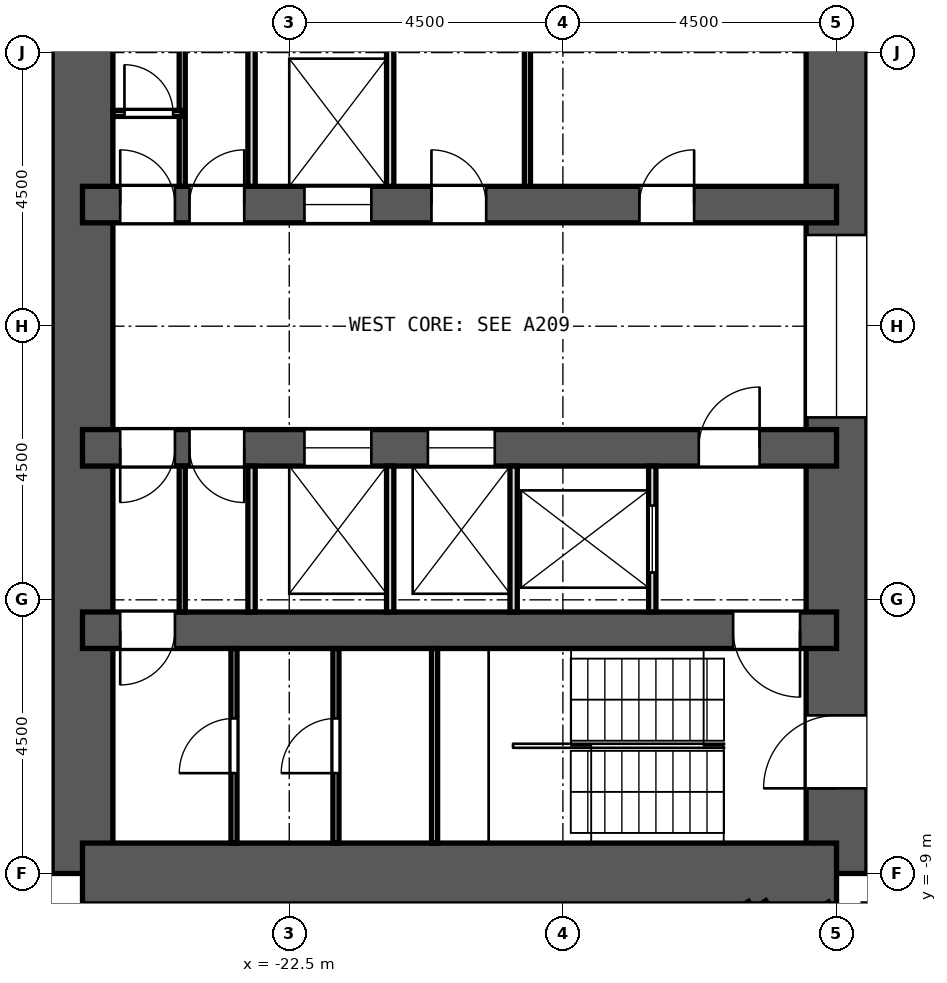
"""IFC4 building model, lengths in metres.
Left out: names, types, materials, properties, quantities, classifications, styles, units other than length and angle.
Written with IfcOpenShell. Run it as: python <this file> out.ifc"""

import sys

from ifc_helpers import new_model, si_unit, direction, frame, frame_2d, origin, place, context, subcontext, project, spatial, rectangle, extrude, element, fill, save


model = new_model("IFC4")
c1 = context("Model", 3, precision=1e-05, world=origin(), true_north=direction((0.0, 1.0)))
c2 = subcontext(c1, "Body", "Model", "MODEL_VIEW")
j1 = project(units=[si_unit("LENGTHUNIT", "METRE"), si_unit("PLANEANGLEUNIT", "RADIAN")], contexts=[c1])
p1 = place(None, origin())
s1 = spatial("IfcSite", under=j1, at=p1, CompositionType="ELEMENT")
p2 = place(p1, origin())
s2 = spatial("IfcBuilding", under=s1, at=p2, CompositionType="ELEMENT")
p3 = place(p2, frame((0.0, 0.0, 26.3)))
s3 = spatial("IfcBuildingStorey", under=s2, at=p3, CompositionType="ELEMENT", Elevation=26.3)
p4 = place(p3, frame((-13.5, -9.0, 0.0), z_axis=(0.0, 0.0, 1.0), x_axis=(0.0, 1.0, 0.0)))
e1 = element("IfcWall", 1, at=p4, inside=s3, PredefinedType="SHEAR", context=c2, shape_type="SweptSolid", body=[
    extrude(rectangle(XDim=18.0, YDim=1.0, at=frame_2d((9.0, 0.0))), origin(), (0.0, 0.0, 1.0), 3.3),
])
p5 = place(p4, frame((15.4, 0.0, 0.0)))
e2 = element("IfcOpeningElement", 2, at=p5, cuts=e1, PredefinedType="OPENING", context=c2, shape_type="SweptSolid", body=[
    extrude(rectangle(XDim=1.2, YDim=2.1, at=frame_2d((0.6, 1.05))), frame((0.0, 0.512, 0.0), z_axis=(0.0, -1.0, 0.0), x_axis=(1.0, 0.0, 0.0)), (0.0, 0.0, 1.0), 1.024),
])
p6 = place(p4, frame((1.4, 0.0, 0.0)))
e3 = element("IfcOpeningElement", 3, at=p6, cuts=e1, PredefinedType="OPENING", context=c2, shape_type="SweptSolid", body=[
    extrude(rectangle(XDim=1.2, YDim=2.1, at=frame_2d((0.6, 1.05))), frame((0.0, 0.512, 0.0), z_axis=(0.0, -1.0, 0.0), x_axis=(1.0, 0.0, 0.0)), (0.0, 0.0, 1.0), 1.024),
])
p7 = place(p4, frame((7.5, 0.0, 0.0)))
e4 = element("IfcOpeningElement", 4, at=p7, cuts=e1, PredefinedType="OPENING", context=c2, shape_type="SweptSolid", body=[
    extrude(rectangle(XDim=3.0, YDim=2.4, at=frame_2d((1.5, 1.2))), frame((0.0, 0.512, 0.0), z_axis=(0.0, -1.0, 0.0), x_axis=(1.0, 0.0, 0.0)), (0.0, 0.0, 1.0), 1.024),
])
p8 = place(p3, frame((-25.9, -9.0, 0.0), z_axis=(0.0, 0.0, 1.0), x_axis=(0.0, 1.0, 0.0)))
e5 = element("IfcWall", 5, at=p8, inside=s3, PredefinedType="SHEAR", context=c2, shape_type="SweptSolid", body=[
    extrude(rectangle(XDim=18.0, YDim=1.0, at=frame_2d((9.0, 0.0))), origin(), (0.0, 0.0, 1.0), 3.3),
])
p9 = place(p3, frame((-13.5, -9.0, 0.0), z_axis=(0.0, 0.0, 1.0), x_axis=(-1.0, 0.0, 0.0)))
e6 = element("IfcWall", 6, at=p9, inside=s3, PredefinedType="SHEAR", context=c2, shape_type="SweptSolid", body=[
    extrude(rectangle(XDim=12.4, YDim=1.0, at=frame_2d((6.2, 0.0))), origin(), (0.0, 0.0, 1.0), 3.3),
])
p10 = place(p3, frame((-13.5, -5.0, 0.0), z_axis=(0.0, 0.0, 1.0), x_axis=(-1.0, 0.0, 0.0)))
e7 = element("IfcWall", 7, at=p10, inside=s3, PredefinedType="SHEAR", context=c2, shape_type="SweptSolid", body=[
    extrude(rectangle(XDim=12.4, YDim=0.6, at=frame_2d((6.2, 0.0))), origin(), (0.0, 0.0, 1.0), 3.3),
])
p11 = place(p10, frame((10.88, 0.0, 0.0)))
e8 = element("IfcOpeningElement", 8, at=p11, cuts=e7, PredefinedType="OPENING", context=c2, shape_type="SweptSolid", body=[
    extrude(rectangle(XDim=0.9, YDim=2.1, at=frame_2d((0.45, 1.05))), frame((0.0, 0.312, 0.0), z_axis=(0.0, -1.0, 0.0), x_axis=(1.0, 0.0, 0.0)), (0.0, 0.0, 1.0), 0.624),
])
p12 = place(p10, frame((0.6, 0.0, 0.0)))
e9 = element("IfcOpeningElement", 9, at=p12, cuts=e7, PredefinedType="OPENING", context=c2, shape_type="SweptSolid", body=[
    extrude(rectangle(XDim=1.1, YDim=2.1, at=frame_2d((0.55, 1.05))), frame((0.0, 0.312, 0.0), z_axis=(0.0, -1.0, 0.0), x_axis=(1.0, 0.0, 0.0)), (0.0, 0.0, 1.0), 0.624),
])
p13 = place(p3, frame((-13.5, 2.0, 0.0), z_axis=(0.0, 0.0, 1.0), x_axis=(-1.0, 0.0, 0.0)))
e10 = element("IfcWall", 10, at=p13, inside=s3, PredefinedType="SHEAR", context=c2, shape_type="SweptSolid", body=[
    extrude(rectangle(XDim=12.4, YDim=0.6, at=frame_2d((6.2, 0.0))), origin(), (0.0, 0.0, 1.0), 3.3),
])
p14 = place(p13, frame((7.65, 0.0, 0.0)))
e11 = element("IfcOpeningElement", 11, at=p14, cuts=e10, PredefinedType="OPENING", context=c2, shape_type="SweptSolid", body=[
    extrude(rectangle(XDim=1.1, YDim=2.1, at=frame_2d((0.55, 1.05))), frame((0.0, 0.312, 0.0), z_axis=(0.0, -1.0, 0.0), x_axis=(1.0, 0.0, 0.0)), (0.0, 0.0, 1.0), 0.624),
])
p15 = place(p13, frame((2.341, 0.0, 0.0)))
e12 = element("IfcOpeningElement", 12, at=p15, cuts=e10, PredefinedType="OPENING", context=c2, shape_type="SweptSolid", body=[
    extrude(rectangle(XDim=0.9, YDim=2.1, at=frame_2d((0.45, 1.05))), frame((0.0, 0.312, 0.0), z_axis=(0.0, -1.0, 0.0), x_axis=(1.0, 0.0, 0.0)), (0.0, 0.0, 1.0), 0.624),
])
p16 = place(p13, frame((5.761, 0.0, 0.0)))
e13 = element("IfcOpeningElement", 13, at=p16, cuts=e10, PredefinedType="OPENING", context=c2, shape_type="SweptSolid", body=[
    extrude(rectangle(XDim=0.9, YDim=2.1, at=frame_2d((0.45, 1.05))), frame((0.0, 0.312, 0.0), z_axis=(0.0, -1.0, 0.0), x_axis=(1.0, 0.0, 0.0)), (0.0, 0.0, 1.0), 0.624),
])
p17 = place(p13, frame((9.74, 0.0, 0.0)))
e14 = element("IfcOpeningElement", 14, at=p17, cuts=e10, PredefinedType="OPENING", context=c2, shape_type="SweptSolid", body=[
    extrude(rectangle(XDim=0.9, YDim=2.1, at=frame_2d((0.45, 1.05))), frame((0.0, 0.312, 0.0), z_axis=(0.0, -1.0, 0.0), x_axis=(1.0, 0.0, 0.0)), (0.0, 0.0, 1.0), 0.624),
])
p18 = place(p13, frame((10.88, 0.0, 0.0)))
e15 = element("IfcOpeningElement", 15, at=p18, cuts=e10, PredefinedType="OPENING", context=c2, shape_type="SweptSolid", body=[
    extrude(rectangle(XDim=0.9, YDim=2.1, at=frame_2d((0.45, 1.05))), frame((0.0, 0.312, 0.0), z_axis=(0.0, -1.0, 0.0), x_axis=(1.0, 0.0, 0.0)), (0.0, 0.0, 1.0), 0.624),
])
p19 = place(p3, frame((-13.5, -2.0, 0.0), z_axis=(0.0, 0.0, 1.0), x_axis=(-1.0, 0.0, 0.0)))
e16 = element("IfcWall", 16, at=p19, inside=s3, PredefinedType="SHEAR", context=c2, shape_type="SweptSolid", body=[
    extrude(rectangle(XDim=12.4, YDim=0.6, at=frame_2d((6.2, 0.0))), origin(), (0.0, 0.0, 1.0), 3.3),
])
p20 = place(p19, frame((5.62, 0.0, 0.0)))
e17 = element("IfcOpeningElement", 17, at=p20, cuts=e16, PredefinedType="OPENING", context=c2, shape_type="SweptSolid", body=[
    extrude(rectangle(XDim=1.1, YDim=2.1, at=frame_2d((0.55, 1.05))), frame((0.0, 0.312, 0.0), z_axis=(0.0, -1.0, 0.0), x_axis=(1.0, 0.0, 0.0)), (0.0, 0.0, 1.0), 0.624),
])
p21 = place(p19, frame((7.65, 0.0, 0.0)))
e18 = element("IfcOpeningElement", 18, at=p21, cuts=e16, PredefinedType="OPENING", context=c2, shape_type="SweptSolid", body=[
    extrude(rectangle(XDim=1.1, YDim=2.1, at=frame_2d((0.55, 1.05))), frame((0.0, 0.312, 0.0), z_axis=(0.0, -1.0, 0.0), x_axis=(1.0, 0.0, 0.0)), (0.0, 0.0, 1.0), 0.624),
])
p22 = place(p19, frame((1.265, 0.0, 0.0)))
e19 = element("IfcOpeningElement", 19, at=p22, cuts=e16, PredefinedType="OPENING", context=c2, shape_type="SweptSolid", body=[
    extrude(rectangle(XDim=1.0, YDim=2.1, at=frame_2d((0.5, 1.05))), frame((0.0, 0.312, 0.0), z_axis=(0.0, -1.0, 0.0), x_axis=(1.0, 0.0, 0.0)), (0.0, 0.0, 1.0), 0.624),
])
p23 = place(p19, frame((9.74, 0.0, 0.0)))
e20 = element("IfcOpeningElement", 20, at=p23, cuts=e16, PredefinedType="OPENING", context=c2, shape_type="SweptSolid", body=[
    extrude(rectangle(XDim=0.9, YDim=2.1, at=frame_2d((0.45, 1.05))), frame((0.0, 0.312, 0.0), z_axis=(0.0, -1.0, 0.0), x_axis=(1.0, 0.0, 0.0)), (0.0, 0.0, 1.0), 0.624),
])
p24 = place(p19, frame((10.88, 0.0, 0.0)))
e21 = element("IfcOpeningElement", 21, at=p24, cuts=e16, PredefinedType="OPENING", context=c2, shape_type="SweptSolid", body=[
    extrude(rectangle(XDim=0.9, YDim=2.1, at=frame_2d((0.45, 1.05))), frame((0.0, 0.312, 0.0), z_axis=(0.0, -1.0, 0.0), x_axis=(1.0, 0.0, 0.0)), (0.0, 0.0, 1.0), 0.624),
])
p25 = place(p3, frame((-27.523, -7.971, 0.0), z_axis=(0.0, 0.0, 1.0), x_axis=(0.342028474173, -0.939689588564, 0.0)))
e22 = element("IfcWall", 22, at=p25, inside=s3, PredefinedType="SOLIDWALL", context=c2, shape_type="SweptSolid", body=[
    extrude(rectangle(XDim=3.846, YDim=0.6, at=frame_2d((1.923, 0.0))), origin(), (0.0, 0.0, 1.0), 2.75),
])
p26 = place(p3, frame((-13.683, -9.5, 0.0), z_axis=(0.0, 0.0, 1.0), x_axis=(0.500018234033, -0.866014876105, 0.0)))
e23 = element("IfcWall", 23, at=p26, inside=s3, PredefinedType="PARTITIONING", context=c2, shape_type="SweptSolid", body=[
    extrude(rectangle(XDim=1.286, YDim=0.125, at=frame_2d((0.643, 0.0))), origin(), (0.0, 0.0, 1.0), 2.75),
])
p27 = place(p3, frame((-19.283, -12.28, 0.0), z_axis=(0.0, 0.0, 1.0), x_axis=(0.843445789111, 0.537214296935, 0.0)))
e24 = element("IfcWall", 24, at=p27, inside=s3, PredefinedType="PARTITIONING", context=c2, shape_type="SweptSolid", body=[
    extrude(rectangle(XDim=5.175, YDim=0.1, at=frame_2d((2.587, 0.0))), origin(), (0.0, 0.0, 1.0), 2.75),
])
p28 = place(p27, frame((2.113, 0.0, 0.0)))
e25 = element("IfcOpeningElement", 25, at=p28, cuts=e24, PredefinedType="OPENING", context=c2, shape_type="SweptSolid", body=[
    extrude(rectangle(XDim=0.9, YDim=2.1, at=frame_2d((0.45, 1.05))), frame((0.0, 0.062, 0.0), z_axis=(0.0, -1.0, 0.0), x_axis=(1.0, 0.0, 0.0)), (0.0, 0.0, 1.0), 0.124),
])
p29 = place(p3, frame((-15.905, -10.328, 0.0), z_axis=(0.0, 0.0, 1.0), x_axis=(0.83882853689, 0.544395706908, 0.0)))
e26 = element("IfcWall", 26, at=p29, inside=s3, PredefinedType="PARTITIONING", context=c2, shape_type="SweptSolid", body=[
    extrude(rectangle(XDim=1.521, YDim=0.125, at=frame_2d((0.76, 0.0))), origin(), (0.0, 0.0, 1.0), 2.75),
])
p30 = place(p3, frame((-18.583, 2.3, 0.0), z_axis=(0.0, 0.0, 1.0), x_axis=(0.0, 1.0, 0.0)))
e27 = element("IfcWall", 27, at=p30, inside=s3, PredefinedType="PARTITIONING", context=c2, shape_type="SweptSolid", body=[
    extrude(rectangle(XDim=2.4, YDim=0.1, at=frame_2d((1.2, 0.0))), origin(), (0.0, 0.0, 1.0), 2.75),
])
for number, where, z_axis, x_axis in (
    (28, (-20.84, 2.3, 0.0), (0.0, 0.0, 1.0), (0.0, 1.0, 0.0)),
    (29, (-23.12, 2.3, 0.0), (0.0, 0.0, 1.0), (0.0, 1.0, 0.0)),
):
    element("IfcWall", number, at=place(p3, frame(where, z_axis=z_axis, x_axis=x_axis)), inside=s3, PredefinedType="PARTITIONING", context=c2, shape_type="SweptSolid", body=[
        extrude(rectangle(XDim=2.4, YDim=0.12, at=frame_2d((1.2, 0.0))), origin(), (0.0, 0.0, 1.0), 2.75),
    ])
p31 = place(p3, frame((-24.26, 2.3, 0.0), z_axis=(0.0, 0.0, 1.0), x_axis=(0.0, 1.0, 0.0)))
e30 = element("IfcWall", 30, at=p31, inside=s3, PredefinedType="PARTITIONING", context=c2, shape_type="SweptSolid", body=[
    extrude(rectangle(XDim=2.4, YDim=0.1, at=frame_2d((1.2, 0.0))), origin(), (0.0, 0.0, 1.0), 2.75),
])
p32 = place(p3, frame((-16.53, -4.7, 0.0), z_axis=(0.0, 0.0, 1.0), x_axis=(0.0, 1.0, 0.0)))
e31 = element("IfcWall", 31, at=p32, inside=s3, PredefinedType="PARTITIONING", context=c2, shape_type="SweptSolid", body=[
    extrude(rectangle(XDim=2.4, YDim=0.12, at=frame_2d((1.2, 0.0))), origin(), (0.0, 0.0, 1.0), 2.75),
])
p33 = place(p32, frame((0.65, 0.0, 0.0)))
e32 = element("IfcOpeningElement", 32, at=p33, cuts=e31, PredefinedType="OPENING", context=c2, shape_type="SweptSolid", body=[
    extrude(rectangle(XDim=1.1, YDim=2.1, at=frame_2d((0.55, 1.05))), frame((0.0, 0.072, 0.0), z_axis=(0.0, -1.0, 0.0), x_axis=(1.0, 0.0, 0.0)), (0.0, 0.0, 1.0), 0.144),
])
for number, where, z_axis, x_axis in (
    (33, (-18.81, -4.7, 0.0), (0.0, 0.0, 1.0), (0.0, 1.0, 0.0)),
    (34, (-20.84, -4.7, 0.0), (0.0, 0.0, 1.0), (0.0, 1.0, 0.0)),
    (35, (-23.12, -4.7, 0.0), (0.0, 0.0, 1.0), (0.0, 1.0, 0.0)),
):
    element("IfcWall", number, at=place(p3, frame(where, z_axis=z_axis, x_axis=x_axis)), inside=s3, PredefinedType="PARTITIONING", context=c2, shape_type="SweptSolid", body=[
        extrude(rectangle(XDim=2.4, YDim=0.12, at=frame_2d((1.2, 0.0))), origin(), (0.0, 0.0, 1.0), 2.75),
    ])
p34 = place(p3, frame((-24.26, -4.7, 0.0), z_axis=(0.0, 0.0, 1.0), x_axis=(0.0, 1.0, 0.0)))
e36 = element("IfcWall", 36, at=p34, inside=s3, PredefinedType="PARTITIONING", context=c2, shape_type="SweptSolid", body=[
    extrude(rectangle(XDim=2.4, YDim=0.1, at=frame_2d((1.2, 0.0))), origin(), (0.0, 0.0, 1.0), 2.75),
])
p35 = place(p3, frame((-24.26, 3.5, 0.0), z_axis=(0.0, 0.0, 1.0), x_axis=(-1.0, 0.0, 0.0)))
e37 = element("IfcWall", 37, at=p35, inside=s3, PredefinedType="PARTITIONING", context=c2, shape_type="SweptSolid", body=[
    extrude(rectangle(XDim=1.14, YDim=0.1, at=frame_2d((0.57, 0.0))), origin(), (0.0, 0.0, 1.0), 2.75),
])
p36 = place(p35, frame((0.15, 0.0, 0.0)))
e38 = element("IfcOpeningElement", 38, at=p36, cuts=e37, PredefinedType="OPENING", context=c2, shape_type="SweptSolid", body=[
    extrude(rectangle(XDim=0.8, YDim=2.1, at=frame_2d((0.4, 1.05))), frame((0.0, 0.062, 0.0), z_axis=(0.0, -1.0, 0.0), x_axis=(1.0, 0.0, 0.0)), (0.0, 0.0, 1.0), 0.124),
])
p37 = place(p3, frame((-20.11, -8.5, 0.0), z_axis=(0.0, 0.0, 1.0), x_axis=(0.0, 1.0, 0.0)))
e39 = element("IfcWall", 39, at=p37, inside=s3, PredefinedType="PARTITIONING", context=c2, shape_type="SweptSolid", body=[
    extrude(rectangle(XDim=3.2, YDim=0.1, at=frame_2d((1.6, 0.0))), origin(), (0.0, 0.0, 1.0), 2.75),
])
p38 = place(p3, frame((-21.732, -8.5, 0.0), z_axis=(0.0, 0.0, 1.0), x_axis=(0.0, 1.0, 0.0)))
e40 = element("IfcWall", 40, at=p38, inside=s3, PredefinedType="PARTITIONING", context=c2, shape_type="SweptSolid", body=[
    extrude(rectangle(XDim=3.2, YDim=0.1, at=frame_2d((1.6, 0.0))), origin(), (0.0, 0.0, 1.0), 2.75),
])
p39 = place(p38, frame((1.15, 0.0, 0.0)))
e41 = element("IfcOpeningElement", 41, at=p39, cuts=e40, PredefinedType="OPENING", context=c2, shape_type="SweptSolid", body=[
    extrude(rectangle(XDim=0.9, YDim=2.1, at=frame_2d((0.45, 1.05))), frame((0.0, 0.062, 0.0), z_axis=(0.0, -1.0, 0.0), x_axis=(1.0, 0.0, 0.0)), (0.0, 0.0, 1.0), 0.124),
])
p40 = place(p3, frame((-23.409, -8.5, 0.0), z_axis=(0.0, 0.0, 1.0), x_axis=(0.0, 1.0, 0.0)))
e42 = element("IfcWall", 42, at=p40, inside=s3, PredefinedType="PARTITIONING", context=c2, shape_type="SweptSolid", body=[
    extrude(rectangle(XDim=3.2, YDim=0.1, at=frame_2d((1.6, 0.0))), origin(), (0.0, 0.0, 1.0), 2.75),
])
p41 = place(p40, frame((1.15, 0.0, 0.0)))
e43 = element("IfcOpeningElement", 43, at=p41, cuts=e42, PredefinedType="OPENING", context=c2, shape_type="SweptSolid", body=[
    extrude(rectangle(XDim=0.9, YDim=2.1, at=frame_2d((0.45, 1.05))), frame((0.0, 0.062, 0.0), z_axis=(0.0, -1.0, 0.0), x_axis=(1.0, 0.0, 0.0)), (0.0, 0.0, 1.0), 0.124),
])
p42 = place(p14, origin())
e44 = element("IfcDoor", 44, at=p42, inside=s3, OperationType="DOUBLE_DOOR_SLIDING", PredefinedType="DOOR", context=c2, shape_type="SweptSolid", body=[
    extrude(rectangle(XDim=1.1, YDim=2.1, at=frame_2d((0.55, 1.05))), frame((0.0, 0.025, 0.0), z_axis=(0.0, -1.0, 0.0), x_axis=(1.0, 0.0, 0.0)), (0.0, 0.0, 1.0), 0.05),
])
fill(e11, e44)
p43 = place(p33, origin())
e45 = element("IfcDoor", 45, at=p43, inside=s3, OperationType="DOUBLE_DOOR_SLIDING", PredefinedType="DOOR", context=c2, shape_type="SweptSolid", body=[
    extrude(rectangle(XDim=1.1, YDim=2.1, at=frame_2d((0.55, 1.05))), frame((0.0, 0.025, 0.0), z_axis=(0.0, -1.0, 0.0), x_axis=(1.0, 0.0, 0.0)), (0.0, 0.0, 1.0), 0.05),
])
fill(e32, e45)
p44 = place(p20, origin())
e46 = element("IfcDoor", 46, at=p44, inside=s3, OperationType="DOUBLE_DOOR_SLIDING", PredefinedType="DOOR", context=c2, shape_type="SweptSolid", body=[
    extrude(rectangle(XDim=1.1, YDim=2.1, at=frame_2d((0.55, 1.05))), frame((0.0, 0.025, 0.0), z_axis=(0.0, -1.0, 0.0), x_axis=(1.0, 0.0, 0.0)), (0.0, 0.0, 1.0), 0.05),
])
fill(e17, e46)
p45 = place(p21, origin())
e47 = element("IfcDoor", 47, at=p45, inside=s3, OperationType="DOUBLE_DOOR_SLIDING", PredefinedType="DOOR", context=c2, shape_type="SweptSolid", body=[
    extrude(rectangle(XDim=1.1, YDim=2.1, at=frame_2d((0.55, 1.05))), frame((0.0, 0.025, 0.0), z_axis=(0.0, -1.0, 0.0), x_axis=(1.0, 0.0, 0.0)), (0.0, 0.0, 1.0), 0.05),
])
fill(e18, e47)
p46 = place(p15, frame((0.9, 0.0, 0.0), z_axis=(0.0, 0.0, 1.0), x_axis=(-1.0, 0.0, 0.0)))
e48 = element("IfcDoor", 48, at=p46, inside=s3, OperationType="SINGLE_SWING_RIGHT", PredefinedType="DOOR", context=c2, shape_type="SweptSolid", body=[
    extrude(rectangle(XDim=0.9, YDim=2.1, at=frame_2d((0.45, 1.05))), frame((0.0, 0.025, 0.0), z_axis=(0.0, -1.0, 0.0), x_axis=(1.0, 0.0, 0.0)), (0.0, 0.0, 1.0), 0.05),
])
fill(e12, e48)
p47 = place(p16, frame((0.9, 0.0, 0.0), z_axis=(0.0, 0.0, 1.0), x_axis=(-1.0, 0.0, 0.0)))
e49 = element("IfcDoor", 49, at=p47, inside=s3, OperationType="SINGLE_SWING_LEFT", PredefinedType="DOOR", context=c2, shape_type="SweptSolid", body=[
    extrude(rectangle(XDim=0.9, YDim=2.1, at=frame_2d((0.45, 1.05))), frame((0.0, 0.025, 0.0), z_axis=(0.0, -1.0, 0.0), x_axis=(1.0, 0.0, 0.0)), (0.0, 0.0, 1.0), 0.05),
])
fill(e13, e49)
p48 = place(p17, frame((0.9, 0.0, 0.0), z_axis=(0.0, 0.0, 1.0), x_axis=(-1.0, 0.0, 0.0)))
e50 = element("IfcDoor", 50, at=p48, inside=s3, OperationType="SINGLE_SWING_RIGHT", PredefinedType="DOOR", context=c2, shape_type="SweptSolid", body=[
    extrude(rectangle(XDim=0.9, YDim=2.1, at=frame_2d((0.45, 1.05))), frame((0.0, 0.025, 0.0), z_axis=(0.0, -1.0, 0.0), x_axis=(1.0, 0.0, 0.0)), (0.0, 0.0, 1.0), 0.05),
])
fill(e14, e50)
p49 = place(p18, frame((0.9, 0.0, 0.0), z_axis=(0.0, 0.0, 1.0), x_axis=(-1.0, 0.0, 0.0)))
e51 = element("IfcDoor", 51, at=p49, inside=s3, OperationType="SINGLE_SWING_LEFT", PredefinedType="DOOR", context=c2, shape_type="SweptSolid", body=[
    extrude(rectangle(XDim=0.9, YDim=2.1, at=frame_2d((0.45, 1.05))), frame((0.0, 0.025, 0.0), z_axis=(0.0, -1.0, 0.0), x_axis=(1.0, 0.0, 0.0)), (0.0, 0.0, 1.0), 0.05),
])
fill(e15, e51)
p50 = place(p22, frame((1.0, 0.0, 0.0), z_axis=(0.0, 0.0, 1.0), x_axis=(-1.0, 0.0, 0.0)))
e52 = element("IfcDoor", 52, at=p50, inside=s3, OperationType="SINGLE_SWING_RIGHT", PredefinedType="DOOR", context=c2, shape_type="SweptSolid", body=[
    extrude(rectangle(XDim=1.0, YDim=2.1, at=frame_2d((0.5, 1.05))), frame((0.0, 0.025, 0.0), z_axis=(0.0, -1.0, 0.0), x_axis=(1.0, 0.0, 0.0)), (0.0, 0.0, 1.0), 0.05),
])
fill(e19, e52)
p51 = place(p23, origin())
e53 = element("IfcDoor", 53, at=p51, inside=s3, OperationType="SINGLE_SWING_LEFT", PredefinedType="DOOR", context=c2, shape_type="SweptSolid", body=[
    extrude(rectangle(XDim=0.9, YDim=2.1, at=frame_2d((0.45, 1.05))), frame((0.0, 0.025, 0.0), z_axis=(0.0, -1.0, 0.0), x_axis=(1.0, 0.0, 0.0)), (0.0, 0.0, 1.0), 0.05),
])
fill(e20, e53)
p52 = place(p24, origin())
e54 = element("IfcDoor", 54, at=p52, inside=s3, OperationType="SINGLE_SWING_RIGHT", PredefinedType="DOOR", context=c2, shape_type="SweptSolid", body=[
    extrude(rectangle(XDim=0.9, YDim=2.1, at=frame_2d((0.45, 1.05))), frame((0.0, 0.025, 0.0), z_axis=(0.0, -1.0, 0.0), x_axis=(1.0, 0.0, 0.0)), (0.0, 0.0, 1.0), 0.05),
])
fill(e21, e54)
p53 = place(p36, frame((0.8, 0.0, 0.0), z_axis=(0.0, 0.0, 1.0), x_axis=(-1.0, 0.0, 0.0)))
e55 = element("IfcDoor", 55, at=p53, inside=s3, OperationType="SINGLE_SWING_LEFT", PredefinedType="DOOR", context=c2, shape_type="SweptSolid", body=[
    extrude(rectangle(XDim=0.8, YDim=2.1, at=frame_2d((0.4, 1.05))), frame((0.0, 0.025, 0.0), z_axis=(0.0, -1.0, 0.0), x_axis=(1.0, 0.0, 0.0)), (0.0, 0.0, 1.0), 0.05),
])
fill(e38, e55)
p54 = place(p41, origin())
e56 = element("IfcDoor", 56, at=p54, inside=s3, OperationType="SINGLE_SWING_LEFT", PredefinedType="DOOR", context=c2, shape_type="SweptSolid", body=[
    extrude(rectangle(XDim=0.9, YDim=2.1, at=frame_2d((0.45, 1.05))), frame((0.0, 0.025, 0.0), z_axis=(0.0, -1.0, 0.0), x_axis=(1.0, 0.0, 0.0)), (0.0, 0.0, 1.0), 0.05),
])
fill(e43, e56)
p55 = place(p39, origin())
e57 = element("IfcDoor", 57, at=p55, inside=s3, OperationType="SINGLE_SWING_LEFT", PredefinedType="DOOR", context=c2, shape_type="SweptSolid", body=[
    extrude(rectangle(XDim=0.9, YDim=2.1, at=frame_2d((0.45, 1.05))), frame((0.0, 0.025, 0.0), z_axis=(0.0, -1.0, 0.0), x_axis=(1.0, 0.0, 0.0)), (0.0, 0.0, 1.0), 0.05),
])
fill(e41, e57)
p56 = place(p11, origin())
e58 = element("IfcDoor", 58, at=p56, inside=s3, OperationType="SINGLE_SWING_RIGHT", PredefinedType="DOOR", context=c2, shape_type="SweptSolid", body=[
    extrude(rectangle(XDim=0.9, YDim=2.1, at=frame_2d((0.45, 1.05))), frame((0.0, 0.025, 0.0), z_axis=(0.0, -1.0, 0.0), x_axis=(1.0, 0.0, 0.0)), (0.0, 0.0, 1.0), 0.05),
])
fill(e8, e58)
p57 = place(p12, origin())
e59 = element("IfcDoor", 59, at=p57, inside=s3, OperationType="SINGLE_SWING_LEFT", PredefinedType="DOOR", context=c2, shape_type="SweptSolid", body=[
    extrude(rectangle(XDim=1.1, YDim=2.1, at=frame_2d((0.55, 1.05))), frame((0.0, 0.025, 0.0), z_axis=(0.0, -1.0, 0.0), x_axis=(1.0, 0.0, 0.0)), (0.0, 0.0, 1.0), 0.05),
])
fill(e9, e59)
p58 = place(p6, origin())
e60 = element("IfcDoor", 60, at=p58, inside=s3, OperationType="SINGLE_SWING_LEFT", PredefinedType="DOOR", context=c2, shape_type="SweptSolid", body=[
    extrude(rectangle(XDim=1.2, YDim=2.1, at=frame_2d((0.6, 1.05))), frame((0.0, 0.025, 0.0), z_axis=(0.0, -1.0, 0.0), x_axis=(1.0, 0.0, 0.0)), (0.0, 0.0, 1.0), 0.05),
])
fill(e3, e60)
p59 = place(p7, origin())
e61 = element("IfcDoor", 61, at=p59, inside=s3, OperationType="DOUBLE_DOOR_SLIDING", PredefinedType="DOOR", context=c2, shape_type="SweptSolid", body=[
    extrude(rectangle(XDim=3.0, YDim=2.4, at=frame_2d((1.5, 1.2))), frame((0.0, 0.025, 0.0), z_axis=(0.0, -1.0, 0.0), x_axis=(1.0, 0.0, 0.0)), (0.0, 0.0, 1.0), 0.05),
])
fill(e4, e61)
save(model, sys.argv[1])
